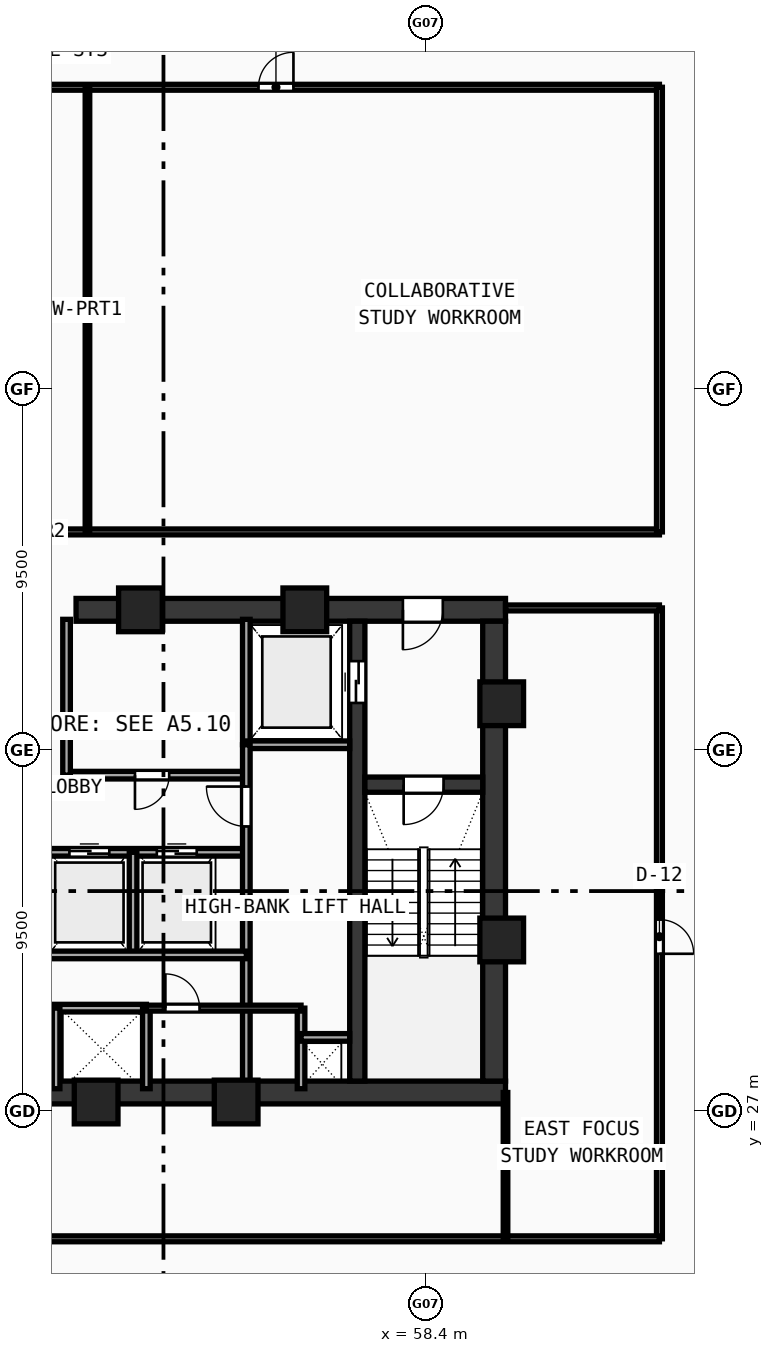
"""IFC4 building model, lengths in metres.
Left out: names, types, materials, properties, quantities, classifications, styles, units other than length and angle.
Written with IfcOpenShell. Run it as: python <this file> out.ifc"""

import sys

from ifc_helpers import new_model, si_unit, direction, frame, frame_2d, origin, origin_with_axes, origin_2d, place, context, subcontext, project, spatial, rectangle, hollow_rectangle, extrude, source, transform, mapped, element, fill, save


model = new_model("IFC4")
c1 = context("Model", 3, precision=1e-05, world=origin(), true_north=direction((0.0, 1.0)))
c2 = subcontext(c1, "Body", "Model", "MODEL_VIEW")
j1 = project(units=[si_unit("LENGTHUNIT", "METRE"), si_unit("PLANEANGLEUNIT", "RADIAN")], contexts=[c1])
p1 = place(None, origin())
s1 = spatial("IfcSite", under=j1, at=p1, CompositionType="ELEMENT")
p2 = place(p1, origin())
s2 = spatial("IfcBuilding", under=s1, at=p2, CompositionType="ELEMENT")
p3 = place(p2, frame((0.0, 0.0, 133.51)))
s3 = spatial("IfcBuildingStorey", under=s2, at=p3, CompositionType="ELEMENT", Elevation=133.51)
p4 = place(p3, frame((35.5, 27.5, 0.0), z_axis=(0.0, 0.0, 1.0), x_axis=(1.0, 0.0, 0.0)))
e1 = element("IfcWall", 1, at=p4, inside=s3, PredefinedType="SHEAR", context=c2, shape_type="SweptSolid", body=[
    extrude(rectangle(XDim=25.0, YDim=0.6, at=frame_2d((12.5, 0.0))), origin(), (0.0, 0.0, 1.0), 3.42),
])
p5 = place(p3, frame((49.2, 40.2, 0.0), z_axis=(0.0, 0.0, 1.0), x_axis=(1.0, 0.0, 0.0)))
e2 = element("IfcWall", 2, at=p5, inside=s3, PredefinedType="SHEAR", context=c2, shape_type="SweptSolid", body=[
    extrude(rectangle(XDim=11.3, YDim=0.6, at=frame_2d((5.65, 0.0))), origin(), (0.0, 0.0, 1.0), 3.42),
])
p6 = place(p5, frame((8.6, 0.0, 0.0)))
e3 = element("IfcOpeningElement", 3, at=p6, cuts=e2, PredefinedType="OPENING", context=c2, shape_type="SweptSolid", body=[
    extrude(rectangle(XDim=1.05, YDim=2.1, at=frame_2d((0.525, 1.05))), frame((0.0, 0.31, 0.0), z_axis=(0.0, -1.0, 0.0), x_axis=(1.0, 0.0, 0.0)), (0.0, 0.0, 1.0), 0.62),
])
p7 = place(p3, frame((60.2, 27.8, 0.0), z_axis=(0.0, 0.0, 1.0), x_axis=(0.0, 1.0, 0.0)))
e4 = element("IfcWall", 4, at=p7, inside=s3, PredefinedType="SHEAR", context=c2, shape_type="SweptSolid", body=[
    extrude(rectangle(XDim=12.1, YDim=0.6, at=frame_2d((6.05, 0.0))), origin(), (0.0, 0.0, 1.0), 3.42),
])
p8 = place(p3, frame((56.6, 27.8, 0.0), z_axis=(0.0, 0.0, 1.0), x_axis=(0.0, 1.0, 0.0)))
e5 = element("IfcWall", 5, at=p8, inside=s3, PredefinedType="SHEAR", context=c2, shape_type="SweptSolid", body=[
    extrude(rectangle(XDim=12.1, YDim=0.4, at=frame_2d((6.05, 0.0))), origin(), (0.0, 0.0, 1.0), 3.42),
])
p9 = place(p8, frame((9.95, 0.0, 0.0)))
e6 = element("IfcOpeningElement", 6, at=p9, cuts=e5, PredefinedType="OPENING", context=c2, shape_type="SweptSolid", body=[
    extrude(rectangle(XDim=1.1, YDim=2.1, at=frame_2d((0.55, 1.05))), frame((0.0, 0.21, 0.0), z_axis=(0.0, -1.0, 0.0), x_axis=(1.0, 0.0, 0.0)), (0.0, 0.0, 1.0), 0.42),
])
p10 = place(p3, frame((56.8, 35.6, 0.0), z_axis=(0.0, 0.0, 1.0), x_axis=(1.0, 0.0, 0.0)))
e7 = element("IfcWall", 7, at=p10, inside=s3, PredefinedType="SHEAR", context=c2, shape_type="SweptSolid", body=[
    extrude(rectangle(XDim=3.1, YDim=0.4, at=frame_2d((1.55, 0.0))), origin(), (0.0, 0.0, 1.0), 3.42),
])
p11 = place(p10, frame((1.02, 0.0, 0.0)))
e8 = element("IfcOpeningElement", 8, at=p11, cuts=e7, PredefinedType="OPENING", context=c2, shape_type="SweptSolid", body=[
    extrude(rectangle(XDim=1.05, YDim=2.1, at=frame_2d((0.525, 1.05))), frame((0.0, 0.21, 0.0), z_axis=(0.0, -1.0, 0.0), x_axis=(1.0, 0.0, 0.0)), (0.0, 0.0, 1.0), 0.42),
])
m1 = source(origin(), c2, "Body", "SweptSolid", [
    extrude(hollow_rectangle(XDim=1.15, YDim=1.15, WallThickness=0.048, at=origin_2d()), origin(), (0.0, 0.0, 1.0), 3.68),
])
for number, where, z_axis, x_axis in (
    (9, (49.729, 27.25, -0.26), (0.0, 0.0, 1.0), (1.0, 0.0, 0.0)),
    (10, (53.412, 27.25, -0.26), (0.0, 0.0, 1.0), (1.0, 0.0, 0.0)),
    (11, (60.4, 31.513, -0.26), (0.0, 0.0, 1.0), (1.0, 0.0, 0.0)),
    (12, (60.4, 37.729, -0.26), (0.0, 0.0, 1.0), (1.0, 0.0, 0.0)),
    (13, (55.219, 40.2, -0.26), (0.0, 0.0, 1.0), (1.0, 0.0, 0.0)),
    (14, (50.894, 40.2, -0.26), (0.0, 0.0, 1.0), (1.0, 0.0, 0.0)),
):
    element("IfcColumn", number, at=place(p3, frame(where, z_axis=z_axis, x_axis=x_axis)), inside=s3, PredefinedType="COLUMN", context=c2, shape_type="MappedRepresentation", body=[
        mapped(m1, transform((0.0, 0.0, 0.0), scale=1.0)),
    ])
p12 = place(p3, frame((53.68, 36.65, 0.0), z_axis=(0.0, 0.0, 1.0), x_axis=(0.0, 1.0, 0.0)))
e15 = element("IfcWall", 15, at=p12, inside=s3, PredefinedType="SOLIDWALL", context=c2, shape_type="SweptSolid", body=[
    extrude(rectangle(XDim=3.3, YDim=0.2, at=frame_2d((1.65, 0.0))), origin(), (0.0, 0.0, 1.0), 3.42),
])
p13 = place(p3, frame((53.68, 36.65, 0.0), z_axis=(0.0, 0.0, 1.0), x_axis=(1.0, 0.0, 0.0)))
e16 = element("IfcWall", 16, at=p13, inside=s3, PredefinedType="SOLIDWALL", context=c2, shape_type="SweptSolid", body=[
    extrude(rectangle(XDim=2.72, YDim=0.2, at=frame_2d((1.36, 0.0))), origin(), (0.0, 0.0, 1.0), 3.42),
])
p14 = place(p3, frame((48.95, 35.85, 0.0), z_axis=(0.0, 0.0, 1.0), x_axis=(1.0, 0.0, 0.0)))
e17 = element("IfcWall", 17, at=p14, inside=s3, PredefinedType="SOLIDWALL", context=c2, shape_type="SweptSolid", body=[
    extrude(rectangle(XDim=4.73, YDim=0.2, at=frame_2d((2.365, 0.0))), origin(), (0.0, 0.0, 1.0), 3.42),
])
p15 = place(p14, frame((1.8, 0.0, 0.0)))
e18 = element("IfcOpeningElement", 18, at=p15, cuts=e17, PredefinedType="OPENING", context=c2, shape_type="SweptSolid", body=[
    extrude(rectangle(XDim=0.9, YDim=2.1, at=frame_2d((0.45, 1.05))), frame((0.0, 0.11, 0.0), z_axis=(0.0, -1.0, 0.0), x_axis=(1.0, 0.0, 0.0)), (0.0, 0.0, 1.0), 0.22),
])
p16 = place(p3, frame((48.95, 35.85, 0.0), z_axis=(0.0, 0.0, 1.0), x_axis=(0.0, 1.0, 0.0)))
e19 = element("IfcWall", 19, at=p16, inside=s3, PredefinedType="SOLIDWALL", context=c2, shape_type="SweptSolid", body=[
    extrude(rectangle(XDim=4.1, YDim=0.2, at=frame_2d((2.05, 0.0))), origin(), (0.0, 0.0, 1.0), 3.42),
])
p17 = place(p3, frame((43.85, 33.82, 0.0), z_axis=(0.0, 0.0, 1.0), x_axis=(1.0, 0.0, 0.0)))
e20 = element("IfcWall", 20, at=p17, inside=s3, PredefinedType="SOLIDWALL", context=c2, shape_type="SweptSolid", body=[
    extrude(rectangle(XDim=9.83, YDim=0.2, at=frame_2d((4.915, 0.0))), origin(), (0.0, 0.0, 1.0), 3.42),
])
p18 = place(p17, frame((0.575, 0.0, 0.0)))
e21 = element("IfcOpeningElement", 21, at=p18, cuts=e20, PredefinedType="OPENING", context=c2, shape_type="SweptSolid", body=[
    extrude(rectangle(XDim=1.05, YDim=2.1, at=frame_2d((0.525, 1.05))), frame((0.0, 0.11, 0.0), z_axis=(0.0, -1.0, 0.0), x_axis=(1.0, 0.0, 0.0)), (0.0, 0.0, 1.0), 0.22),
])
p19 = place(p17, frame((2.875, 0.0, 0.0)))
e22 = element("IfcOpeningElement", 22, at=p19, cuts=e20, PredefinedType="OPENING", context=c2, shape_type="SweptSolid", body=[
    extrude(rectangle(XDim=1.05, YDim=2.1, at=frame_2d((0.525, 1.05))), frame((0.0, 0.11, 0.0), z_axis=(0.0, -1.0, 0.0), x_axis=(1.0, 0.0, 0.0)), (0.0, 0.0, 1.0), 0.22),
])
p20 = place(p17, frame((5.175, 0.0, 0.0)))
e23 = element("IfcOpeningElement", 23, at=p20, cuts=e20, PredefinedType="OPENING", context=c2, shape_type="SweptSolid", body=[
    extrude(rectangle(XDim=1.05, YDim=2.1, at=frame_2d((0.525, 1.05))), frame((0.0, 0.11, 0.0), z_axis=(0.0, -1.0, 0.0), x_axis=(1.0, 0.0, 0.0)), (0.0, 0.0, 1.0), 0.22),
])
p21 = place(p17, frame((7.475, 0.0, 0.0)))
e24 = element("IfcOpeningElement", 24, at=p21, cuts=e20, PredefinedType="OPENING", context=c2, shape_type="SweptSolid", body=[
    extrude(rectangle(XDim=1.05, YDim=2.1, at=frame_2d((0.525, 1.05))), frame((0.0, 0.11, 0.0), z_axis=(0.0, -1.0, 0.0), x_axis=(1.0, 0.0, 0.0)), (0.0, 0.0, 1.0), 0.22),
])
p22 = place(p3, frame((53.68, 27.6, 0.0), z_axis=(0.0, 0.0, 1.0), x_axis=(0.0, 1.0, 0.0)))
e25 = element("IfcWall", 25, at=p22, inside=s3, PredefinedType="SOLIDWALL", context=c2, shape_type="SweptSolid", body=[
    extrude(rectangle(XDim=9.05, YDim=0.2, at=frame_2d((4.525, 0.0))), origin(), (0.0, 0.0, 1.0), 3.42),
])
p23 = place(p22, frame((6.9, 0.0, 0.0)))
e26 = element("IfcOpeningElement", 26, at=p23, cuts=e25, PredefinedType="OPENING", context=c2, shape_type="SweptSolid", body=[
    extrude(rectangle(XDim=1.05, YDim=2.1, at=frame_2d((0.525, 1.05))), frame((0.0, 0.11, 0.0), z_axis=(0.0, -1.0, 0.0), x_axis=(1.0, 0.0, 0.0)), (0.0, 0.0, 1.0), 0.22),
])
p24 = place(p3, frame((50.7, 31.12, 0.0), z_axis=(0.0, 0.0, 1.0), x_axis=(0.0, 1.0, 0.0)))
e27 = element("IfcWall", 27, at=p24, inside=s3, PredefinedType="SOLIDWALL", context=c2, shape_type="SweptSolid", body=[
    extrude(rectangle(XDim=2.7, YDim=0.2, at=frame_2d((1.35, 0.0))), origin(), (0.0, 0.0, 1.0), 3.42),
])
p25 = place(p3, frame((43.85, 29.72, 0.0), z_axis=(0.0, 0.0, 1.0), x_axis=(1.0, 0.0, 0.0)))
e28 = element("IfcWall", 28, at=p25, inside=s3, PredefinedType="SOLIDWALL", context=c2, shape_type="SweptSolid", body=[
    extrude(rectangle(XDim=7.2, YDim=0.2, at=frame_2d((3.6, 0.0))), origin(), (0.0, 0.0, 1.0), 3.42),
])
p26 = place(p3, frame((51.05, 27.6, 0.0), z_axis=(0.0, 0.0, 1.0), x_axis=(0.0, 1.0, 0.0)))
e29 = element("IfcWall", 29, at=p26, inside=s3, PredefinedType="SOLIDWALL", context=c2, shape_type="SweptSolid", body=[
    extrude(rectangle(XDim=2.12, YDim=0.2, at=frame_2d((1.06, 0.0))), origin(), (0.0, 0.0, 1.0), 3.42),
])
p27 = place(p3, frame((43.85, 31.12, 0.0), z_axis=(0.0, 0.0, 1.0), x_axis=(1.0, 0.0, 0.0)))
e30 = element("IfcWall", 30, at=p27, inside=s3, PredefinedType="SOLIDWALL", context=c2, shape_type="SweptSolid", body=[
    extrude(rectangle(XDim=9.83, YDim=0.2, at=frame_2d((4.915, 0.0))), origin(), (0.0, 0.0, 1.0), 3.42),
])
for number, where, z_axis, x_axis in (
    (31, (48.675, 27.6, 0.0), (0.0, 0.0, 1.0), (0.0, 1.0, 0.0)),
    (32, (55.12, 27.6, 0.0), (0.0, 0.0, 1.0), (0.0, 1.0, 0.0)),
):
    element("IfcWall", number, at=place(p3, frame(where, z_axis=z_axis, x_axis=x_axis)), inside=s3, PredefinedType="SOLIDWALL", context=c2, shape_type="SweptSolid", body=[
        extrude(rectangle(XDim=2.12, YDim=0.2, at=frame_2d((1.06, 0.0))), origin(), (0.0, 0.0, 1.0), 3.42),
    ])
p28 = place(p3, frame((55.12, 28.95, 0.0), z_axis=(0.0, 0.0, 1.0), x_axis=(1.0, 0.0, 0.0)))
e33 = element("IfcWall", 33, at=p28, inside=s3, PredefinedType="SOLIDWALL", context=c2, shape_type="SweptSolid", body=[
    extrude(rectangle(XDim=1.28, YDim=0.2, at=frame_2d((0.64, 0.0))), origin(), (0.0, 0.0, 1.0), 3.42),
])
p29 = place(p3, frame((51.05, 29.72, 0.0), z_axis=(0.0, 0.0, 1.0), x_axis=(1.0, 0.0, 0.0)))
e34 = element("IfcWall", 34, at=p29, inside=s3, PredefinedType="PARTITIONING", context=c2, shape_type="SweptSolid", body=[
    extrude(rectangle(XDim=4.07, YDim=0.155, at=frame_2d((2.035, 0.0))), origin(), (0.0, 0.0, 1.0), 3.42),
])
p30 = place(p29, frame((0.5, 0.0, 0.0)))
e35 = element("IfcOpeningElement", 35, at=p30, cuts=e34, PredefinedType="OPENING", context=c2, shape_type="SweptSolid", body=[
    extrude(rectangle(XDim=0.9, YDim=2.1, at=frame_2d((0.45, 1.05))), frame((0.0, 0.087, 0.0), z_axis=(0.0, -1.0, 0.0), x_axis=(1.0, 0.0, 0.0)), (0.0, 0.0, 1.0), 0.175),
])
p31 = place(p3, frame((31.45, 42.25, 0.0), z_axis=(0.0, 0.0, 1.0), x_axis=(1.0, 0.0, 0.0)))
e36 = element("IfcWall", 36, at=p31, inside=s3, PredefinedType="PARTITIONING", context=c2, shape_type="SweptSolid", body=[
    extrude(rectangle(XDim=33.1, YDim=0.155, at=frame_2d((16.55, 0.0))), origin(), (0.0, 0.0, 1.0), 2.77),
])
p32 = place(p3, frame((31.45, 53.95, 0.0), z_axis=(0.0, 0.0, 1.0), x_axis=(1.0, 0.0, 0.0)))
e37 = element("IfcWall", 37, at=p32, inside=s3, PredefinedType="PARTITIONING", context=c2, shape_type="SweptSolid", body=[
    extrude(rectangle(XDim=33.1, YDim=0.155, at=frame_2d((16.55, 0.0))), origin(), (0.0, 0.0, 1.0), 2.77),
])
p33 = place(p32, frame((8.0, 0.0, 0.0)))
e38 = element("IfcOpeningElement", 38, at=p33, cuts=e37, PredefinedType="OPENING", context=c2, shape_type="SweptSolid", body=[
    extrude(rectangle(XDim=0.92, YDim=2.1, at=frame_2d((0.46, 1.05))), frame((0.0, 0.087, 0.0), z_axis=(0.0, -1.0, 0.0), x_axis=(1.0, 0.0, 0.0)), (0.0, 0.0, 1.0), 0.175),
])
p34 = place(p32, frame((22.55, 0.0, 0.0)))
e39 = element("IfcOpeningElement", 39, at=p34, cuts=e37, PredefinedType="OPENING", context=c2, shape_type="SweptSolid", body=[
    extrude(rectangle(XDim=0.92, YDim=2.1, at=frame_2d((0.46, 1.05))), frame((0.0, 0.087, 0.0), z_axis=(0.0, -1.0, 0.0), x_axis=(1.0, 0.0, 0.0)), (0.0, 0.0, 1.0), 0.175),
])
p35 = place(p3, frame((64.55, 42.25, 0.0), z_axis=(0.0, 0.0, 1.0), x_axis=(0.0, 1.0, 0.0)))
e40 = element("IfcWall", 40, at=p35, inside=s3, PredefinedType="PARTITIONING", context=c2, shape_type="SweptSolid", body=[
    extrude(rectangle(XDim=11.7, YDim=0.155, at=frame_2d((5.85, 0.0))), origin(), (0.0, 0.0, 1.0), 2.77),
])
p36 = place(p3, frame((49.5, 42.25, 0.0), z_axis=(0.0, 0.0, 1.0), x_axis=(0.0, 1.0, 0.0)))
e41 = element("IfcWall", 41, at=p36, inside=s3, PredefinedType="PARTITIONING", context=c2, shape_type="SweptSolid", body=[
    extrude(rectangle(XDim=11.7, YDim=0.12, at=frame_2d((5.85, 0.0))), origin(), (0.0, 0.0, 1.0), 3.02),
])
p37 = place(p3, frame((64.55, 23.65, 0.0), z_axis=(0.0, 0.0, 1.0), x_axis=(0.0, 1.0, 0.0)))
e42 = element("IfcWall", 42, at=p37, inside=s3, PredefinedType="PARTITIONING", context=c2, shape_type="SweptSolid", body=[
    extrude(rectangle(XDim=16.6, YDim=0.155, at=frame_2d((8.3, 0.0))), origin(), (0.0, 0.0, 1.0), 2.77),
])
p38 = place(p37, frame((7.5, 0.0, 0.0)))
e43 = element("IfcOpeningElement", 43, at=p38, cuts=e42, PredefinedType="OPENING", context=c2, shape_type="SweptSolid", body=[
    extrude(rectangle(XDim=0.9, YDim=2.08, at=frame_2d((0.45, 1.04))), frame((0.0, 0.087, 0.0), z_axis=(0.0, -1.0, 0.0), x_axis=(1.0, 0.0, 0.0)), (0.0, 0.0, 1.0), 0.175),
])
p39 = place(p3, frame((31.45, 23.65, 0.0), z_axis=(0.0, 0.0, 1.0), x_axis=(1.0, 0.0, 0.0)))
e44 = element("IfcWall", 44, at=p39, inside=s3, PredefinedType="PARTITIONING", context=c2, shape_type="SweptSolid", body=[
    extrude(rectangle(XDim=33.1, YDim=0.155, at=frame_2d((16.55, 0.0))), origin(), (0.0, 0.0, 1.0), 2.77),
])
p40 = place(p39, frame((16.0, 0.0, 0.0)))
e45 = element("IfcOpeningElement", 45, at=p40, cuts=e44, PredefinedType="OPENING", context=c2, shape_type="SweptSolid", body=[
    extrude(rectangle(XDim=0.92, YDim=2.1, at=frame_2d((0.46, 1.05))), frame((0.0, 0.087, 0.0), z_axis=(0.0, -1.0, 0.0), x_axis=(1.0, 0.0, 0.0)), (0.0, 0.0, 1.0), 0.175),
])
p41 = place(p3, frame((60.5, 40.25, 0.0), z_axis=(0.0, 0.0, 1.0), x_axis=(1.0, 0.0, 0.0)))
e46 = element("IfcWall", 46, at=p41, inside=s3, PredefinedType="PARTITIONING", context=c2, shape_type="SweptSolid", body=[
    extrude(rectangle(XDim=4.05, YDim=0.155, at=frame_2d((2.025, 0.0))), origin(), (0.0, 0.0, 1.0), 3.42),
])
p42 = place(p3, frame((60.5, 23.65, 0.0), z_axis=(0.0, 0.0, 1.0), x_axis=(0.0, 1.0, 0.0)))
e47 = element("IfcWall", 47, at=p42, inside=s3, PredefinedType="PARTITIONING", context=c2, shape_type="SweptSolid", body=[
    extrude(rectangle(XDim=3.85, YDim=0.12, at=frame_2d((1.925, 0.0))), origin(), (0.0, 0.0, 1.0), 3.02),
])
m2 = source(origin(), c2, "Body", "SweptSolid", [
    extrude(rectangle(XDim=1.05, YDim=2.1, at=frame_2d((0.525, 1.05))), frame((0.0, 0.025, 0.0), z_axis=(0.0, -1.0, 0.0), x_axis=(1.0, 0.0, 0.0)), (0.0, 0.0, 1.0), 0.05),
])
p43 = place(p11, frame((1.05, 0.0, 0.0), z_axis=(0.0, 0.0, 1.0), x_axis=(-1.0, 0.0, 0.0)))
e48 = element("IfcDoor", 48, at=p43, inside=s3, OperationType="SINGLE_SWING_RIGHT", PredefinedType="DOOR", context=c2, shape_type="MappedRepresentation", body=[
    mapped(m2, transform((0.0, 0.0, 0.0), scale=1.0)),
])
fill(e8, e48)
p44 = place(p6, frame((1.05, 0.0, 0.0), z_axis=(0.0, 0.0, 1.0), x_axis=(-1.0, 0.0, 0.0)))
e49 = element("IfcDoor", 49, at=p44, inside=s3, OperationType="SINGLE_SWING_RIGHT", PredefinedType="DOOR", context=c2, shape_type="MappedRepresentation", body=[
    mapped(m2, transform((0.0, 0.0, 0.0), scale=1.0)),
])
fill(e3, e49)
m3 = source(origin(), c2, "Body", "SweptSolid", [
    extrude(rectangle(XDim=1.1, YDim=2.1, at=frame_2d((0.55, 1.05))), frame((0.0, 0.025, 0.0), z_axis=(0.0, -1.0, 0.0), x_axis=(1.0, 0.0, 0.0)), (0.0, 0.0, 1.0), 0.05),
])
p45 = place(p9, origin_with_axes())
e50 = element("IfcDoor", 50, at=p45, inside=s3, OperationType="DOUBLE_DOOR_SLIDING", PredefinedType="DOOR", context=c2, shape_type="MappedRepresentation", body=[
    mapped(m3, transform((0.0, 0.0, 0.0), scale=1.0)),
])
fill(e6, e50)
m4 = source(origin(), c2, "Body", "SweptSolid", [
    extrude(rectangle(XDim=0.9, YDim=2.1, at=frame_2d((0.45, 1.05))), frame((0.0, 0.025, 0.0), z_axis=(0.0, -1.0, 0.0), x_axis=(1.0, 0.0, 0.0)), (0.0, 0.0, 1.0), 0.05),
])
p46 = place(p15, frame((0.9, 0.0, 0.0), z_axis=(0.0, 0.0, 1.0), x_axis=(-1.0, 0.0, 0.0)))
e51 = element("IfcDoor", 51, at=p46, inside=s3, OperationType="SINGLE_SWING_RIGHT", PredefinedType="DOOR", context=c2, shape_type="MappedRepresentation", body=[
    mapped(m4, transform((0.0, 0.0, 0.0), scale=1.0)),
])
fill(e18, e51)
p47 = place(p20, origin_with_axes())
e52 = element("IfcDoor", 52, at=p47, inside=s3, OperationType="DOUBLE_DOOR_SLIDING", PredefinedType="DOOR", context=c2, shape_type="MappedRepresentation", body=[
    mapped(m2, transform((0.0, 0.0, 0.0), scale=1.0)),
])
fill(e23, e52)
p48 = place(p21, origin_with_axes())
e53 = element("IfcDoor", 53, at=p48, inside=s3, OperationType="DOUBLE_DOOR_SLIDING", PredefinedType="DOOR", context=c2, shape_type="MappedRepresentation", body=[
    mapped(m2, transform((0.0, 0.0, 0.0), scale=1.0)),
])
fill(e24, e53)
p49 = place(p23, origin_with_axes())
e54 = element("IfcDoor", 54, at=p49, inside=s3, OperationType="SINGLE_SWING_RIGHT", PredefinedType="DOOR", context=c2, shape_type="MappedRepresentation", body=[
    mapped(m2, transform((0.0, 0.0, 0.0), scale=1.0)),
])
fill(e26, e54)
p50 = place(p30, origin_with_axes())
e55 = element("IfcDoor", 55, at=p50, inside=s3, OperationType="SINGLE_SWING_LEFT", PredefinedType="DOOR", context=c2, shape_type="MappedRepresentation", body=[
    mapped(m4, transform((0.0, 0.0, 0.0), scale=1.0)),
])
fill(e35, e55)
m5 = source(origin(), c2, "Body", "SweptSolid", [
    extrude(rectangle(XDim=0.92, YDim=2.1, at=frame_2d((0.46, 1.05))), frame((0.0, 0.025, 0.0), z_axis=(0.0, -1.0, 0.0), x_axis=(1.0, 0.0, 0.0)), (0.0, 0.0, 1.0), 0.05),
])
p51 = place(p34, origin_with_axes())
e56 = element("IfcDoor", 56, at=p51, inside=s3, OperationType="SINGLE_SWING_RIGHT", PredefinedType="DOOR", context=c2, shape_type="MappedRepresentation", body=[
    mapped(m5, transform((0.0, 0.0, 0.0), scale=1.0)),
])
fill(e39, e56)
m6 = source(origin(), c2, "Body", "SweptSolid", [
    extrude(rectangle(XDim=0.9, YDim=2.08, at=frame_2d((0.45, 1.04))), frame((0.0, 0.025, 0.0), z_axis=(0.0, -1.0, 0.0), x_axis=(1.0, 0.0, 0.0)), (0.0, 0.0, 1.0), 0.05),
])
p52 = place(p38, frame((0.9, 0.0, 0.0), z_axis=(0.0, 0.0, 1.0), x_axis=(-1.0, 0.0, 0.0)))
e57 = element("IfcDoor", 57, at=p52, inside=s3, OperationType="SINGLE_SWING_RIGHT", PredefinedType="DOOR", context=c2, shape_type="MappedRepresentation", body=[
    mapped(m6, transform((0.0, 0.0, 0.0), scale=1.0)),
])
fill(e43, e57)
save(model, sys.argv[1])
